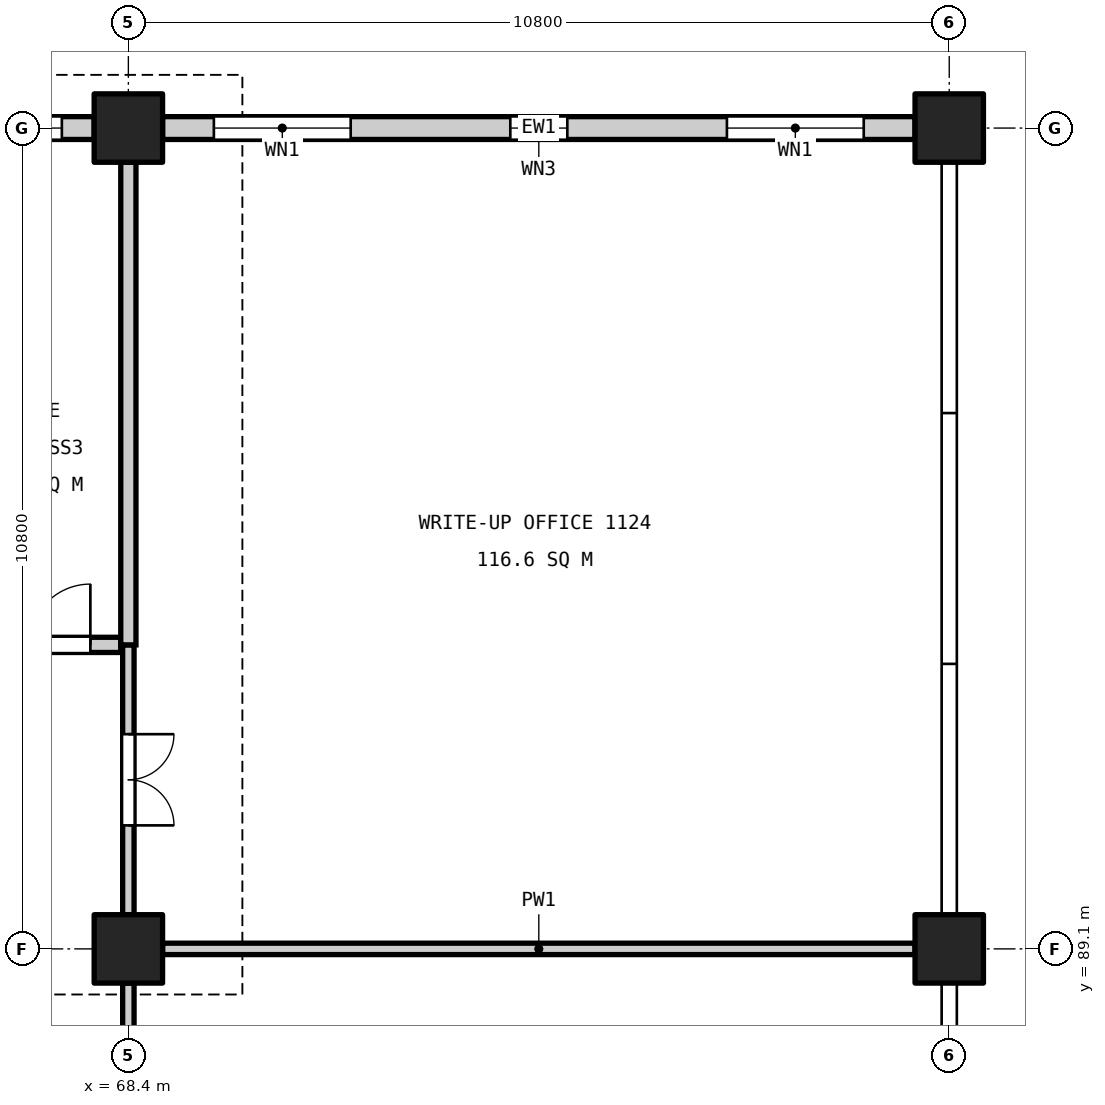
"""IFC4 building model, lengths in metres.
Left out: names, types, materials, properties, quantities, classifications, styles, units other than length and angle.
Written with IfcOpenShell. Run it as: python <this file> out.ifc"""

import sys

from ifc_helpers import new_model, si_unit, direction, frame, frame_2d, origin, origin_2d, place, context, subcontext, project, spatial, rectangle, extrude, element, fill, save


model = new_model("IFC4")
c1 = context("Model", 3, precision=1e-05, world=origin(), true_north=direction((0.0, 1.0)))
c2 = subcontext(c1, "Body", "Model", "MODEL_VIEW")
j1 = project(units=[si_unit("LENGTHUNIT", "METRE"), si_unit("PLANEANGLEUNIT", "RADIAN")], contexts=[c1])
p1 = place(None, origin())
s1 = spatial("IfcSite", under=j1, at=p1, CompositionType="ELEMENT")
p2 = place(p1, origin())
s2 = spatial("IfcBuilding", under=s1, at=p2, CompositionType="ELEMENT")
p3 = place(p2, frame((0.0, 0.0, 55.8)))
s3 = spatial("IfcBuildingStorey", under=s2, at=p3, CompositionType="ELEMENT", Elevation=55.8)
for number, where, z_axis, x_axis in (
    (1, (68.4, 89.1, 0.0), (0.0, 0.0, 1.0), (1.0, 0.0, 0.0)),
    (2, (68.4, 99.9, 0.0), (0.0, 0.0, 1.0), (1.0, 0.0, 0.0)),
    (3, (79.2, 89.1, 0.0), (0.0, 0.0, 1.0), (1.0, 0.0, 0.0)),
    (4, (79.2, 99.9, 0.0), (0.0, 0.0, 1.0), (1.0, 0.0, 0.0)),
):
    element("IfcColumn", number, at=place(p3, frame(where, z_axis=z_axis, x_axis=x_axis)), inside=s3, PredefinedType="COLUMN", context=c2, shape_type="SweptSolid", body=[
        extrude(rectangle(XDim=0.9, YDim=0.9, at=origin_2d()), origin(), (0.0, 0.0, 1.0), 4.8),
    ])
p4 = place(p3, frame((65.9, 99.9, 0.0), z_axis=(0.0, 0.0, 1.0), x_axis=(1.0, 0.0, 0.0)))
e5 = element("IfcWall", 5, at=p4, inside=s3, PredefinedType="STANDARD", context=c2, shape_type="SweptSolid", body=[
    extrude(rectangle(XDim=2.05, YDim=0.3, at=frame_2d((1.025, 0.0))), origin(), (0.0, 0.0, 1.0), 3.85),
])
p5 = place(p4, frame((0.425, 0.0, 0.9)))
e6 = element("IfcOpeningElement", 6, at=p5, cuts=e5, PredefinedType="OPENING", context=c2, shape_type="SweptSolid", body=[
    extrude(rectangle(XDim=1.2, YDim=2.4, at=frame_2d((0.6, 1.2))), frame((0.0, 0.16, 0.0), z_axis=(0.0, -1.0, 0.0), x_axis=(1.0, 0.0, 0.0)), (0.0, 0.0, 1.0), 0.32),
])
p6 = place(p3, frame((68.85, 99.9, 0.0), z_axis=(0.0, 0.0, 1.0), x_axis=(1.0, 0.0, 0.0)))
e7 = element("IfcWall", 7, at=p6, inside=s3, PredefinedType="STANDARD", context=c2, shape_type="SweptSolid", body=[
    extrude(rectangle(XDim=9.9, YDim=0.3, at=frame_2d((4.95, 0.0))), origin(), (0.0, 0.0, 1.0), 3.85),
])
p7 = place(p6, frame((0.675, 0.0, 0.9)))
e8 = element("IfcOpeningElement", 8, at=p7, cuts=e7, PredefinedType="OPENING", context=c2, shape_type="SweptSolid", body=[
    extrude(rectangle(XDim=1.8, YDim=2.4, at=frame_2d((0.9, 1.2))), frame((0.0, 0.16, 0.0), z_axis=(0.0, -1.0, 0.0), x_axis=(1.0, 0.0, 0.0)), (0.0, 0.0, 1.0), 0.32),
])
p8 = place(p6, frame((4.575, 0.0, 0.8)))
e9 = element("IfcOpeningElement", 9, at=p8, cuts=e7, PredefinedType="OPENING", context=c2, shape_type="SweptSolid", body=[
    extrude(rectangle(XDim=0.75, YDim=1.2, at=frame_2d((0.375, 0.6))), frame((0.0, 0.16, 0.0), z_axis=(0.0, -1.0, 0.0), x_axis=(1.0, 0.0, 0.0)), (0.0, 0.0, 1.0), 0.32),
])
p9 = place(p6, frame((7.425, 0.0, 0.9)))
e10 = element("IfcOpeningElement", 10, at=p9, cuts=e7, PredefinedType="OPENING", context=c2, shape_type="SweptSolid", body=[
    extrude(rectangle(XDim=1.8, YDim=2.4, at=frame_2d((0.9, 1.2))), frame((0.0, 0.16, 0.0), z_axis=(0.0, -1.0, 0.0), x_axis=(1.0, 0.0, 0.0)), (0.0, 0.0, 1.0), 0.32),
])
p10 = place(p3, frame((65.9, 93.1, 0.0), z_axis=(0.0, 0.0, 1.0), x_axis=(1.0, 0.0, 0.0)))
e11 = element("IfcWall", 11, at=p10, inside=s3, PredefinedType="PARTITIONING", context=c2, shape_type="SweptSolid", body=[
    extrude(rectangle(XDim=2.4, YDim=0.2, at=frame_2d((1.2, 0.0))), origin(), (0.0, 0.0, 1.0), 3.55),
])
p11 = place(p10, frame((0.4, 0.0, 0.0)))
e12 = element("IfcOpeningElement", 12, at=p11, cuts=e11, PredefinedType="OPENING", context=c2, shape_type="SweptSolid", body=[
    extrude(rectangle(XDim=1.6, YDim=2.1, at=frame_2d((0.8, 1.05))), frame((0.0, 0.11, 0.0), z_axis=(0.0, -1.0, 0.0), x_axis=(1.0, 0.0, 0.0)), (0.0, 0.0, 1.0), 0.22),
])
p12 = place(p3, frame((68.4, 78.75, 0.0), z_axis=(0.0, 0.0, 1.0), x_axis=(0.0, 1.0, 0.0)))
e13 = element("IfcWall", 13, at=p12, inside=s3, PredefinedType="PARTITIONING", context=c2, shape_type="SweptSolid", body=[
    extrude(rectangle(XDim=9.9, YDim=0.15, at=frame_2d((4.95, 0.0))), origin(), (0.0, 0.0, 1.0), 3.55),
])
p13 = place(p12, frame((0.975, 0.0, 0.0)))
e14 = element("IfcOpeningElement", 14, at=p13, cuts=e13, PredefinedType="OPENING", context=c2, shape_type="SweptSolid", body=[
    extrude(rectangle(XDim=1.2, YDim=2.1, at=frame_2d((0.6, 1.05))), frame((0.0, 0.085, 0.0), z_axis=(0.0, -1.0, 0.0), x_axis=(1.0, 0.0, 0.0)), (0.0, 0.0, 1.0), 0.17),
])
p14 = place(p12, frame((4.35, 0.0, 0.0)))
e15 = element("IfcOpeningElement", 15, at=p14, cuts=e13, PredefinedType="OPENING", context=c2, shape_type="SweptSolid", body=[
    extrude(rectangle(XDim=1.2, YDim=2.1, at=frame_2d((0.6, 1.05))), frame((0.0, 0.085, 0.0), z_axis=(0.0, -1.0, 0.0), x_axis=(1.0, 0.0, 0.0)), (0.0, 0.0, 1.0), 0.17),
])
p15 = place(p12, frame((7.725, 0.0, 0.0)))
e16 = element("IfcOpeningElement", 16, at=p15, cuts=e13, PredefinedType="OPENING", context=c2, shape_type="SweptSolid", body=[
    extrude(rectangle(XDim=1.2, YDim=2.1, at=frame_2d((0.6, 1.05))), frame((0.0, 0.085, 0.0), z_axis=(0.0, -1.0, 0.0), x_axis=(1.0, 0.0, 0.0)), (0.0, 0.0, 1.0), 0.17),
])
p16 = place(p3, frame((68.4, 89.55, 0.0), z_axis=(0.0, 0.0, 1.0), x_axis=(0.0, 1.0, 0.0)))
e17 = element("IfcWall", 17, at=p16, inside=s3, PredefinedType="PARTITIONING", context=c2, shape_type="SweptSolid", body=[
    extrude(rectangle(XDim=3.55, YDim=0.15, at=frame_2d((1.775, 0.0))), origin(), (0.0, 0.0, 1.0), 3.55),
])
p17 = place(p16, frame((1.175, 0.0, 0.0)))
e18 = element("IfcOpeningElement", 18, at=p17, cuts=e17, PredefinedType="OPENING", context=c2, shape_type="SweptSolid", body=[
    extrude(rectangle(XDim=1.2, YDim=2.1, at=frame_2d((0.6, 1.05))), frame((0.0, 0.085, 0.0), z_axis=(0.0, -1.0, 0.0), x_axis=(1.0, 0.0, 0.0)), (0.0, 0.0, 1.0), 0.17),
])
p18 = place(p3, frame((68.4, 93.1, 0.0), z_axis=(0.0, 0.0, 1.0), x_axis=(0.0, 1.0, 0.0)))
e19 = element("IfcWall", 19, at=p18, inside=s3, PredefinedType="PARTITIONING", context=c2, shape_type="SweptSolid", body=[
    extrude(rectangle(XDim=6.35, YDim=0.2, at=frame_2d((3.175, 0.0))), origin(), (0.0, 0.0, 1.0), 3.55),
])
p19 = place(p3, frame((68.85, 89.1, 0.0), z_axis=(0.0, 0.0, 1.0), x_axis=(1.0, 0.0, 0.0)))
e20 = element("IfcWall", 20, at=p19, inside=s3, PredefinedType="PARTITIONING", context=c2, shape_type="SweptSolid", body=[
    extrude(rectangle(XDim=9.9, YDim=0.15, at=frame_2d((4.95, 0.0))), origin(), (0.0, 0.0, 1.0), 3.85),
])
p20 = place(p5, origin())
e21 = element("IfcWindow", 21, at=p20, inside=s3, PartitioningType="SINGLE_PANEL", PredefinedType="WINDOW", context=c2, shape_type="SweptSolid", body=[
    extrude(rectangle(XDim=1.2, YDim=2.4, at=frame_2d((0.6, 1.2))), frame((0.0, 0.03, 0.0), z_axis=(0.0, -1.0, 0.0), x_axis=(1.0, 0.0, 0.0)), (0.0, 0.0, 1.0), 0.06),
])
fill(e6, e21)
p21 = place(p7, origin())
e22 = element("IfcWindow", 22, at=p21, inside=s3, PartitioningType="SINGLE_PANEL", PredefinedType="WINDOW", context=c2, shape_type="SweptSolid", body=[
    extrude(rectangle(XDim=1.8, YDim=2.4, at=frame_2d((0.9, 1.2))), frame((0.0, 0.03, 0.0), z_axis=(0.0, -1.0, 0.0), x_axis=(1.0, 0.0, 0.0)), (0.0, 0.0, 1.0), 0.06),
])
fill(e8, e22)
p22 = place(p8, origin())
e23 = element("IfcWindow", 23, at=p22, inside=s3, PartitioningType="SINGLE_PANEL", PredefinedType="WINDOW", context=c2, shape_type="SweptSolid", body=[
    extrude(rectangle(XDim=0.75, YDim=1.2, at=frame_2d((0.375, 0.6))), frame((0.0, 0.03, 0.0), z_axis=(0.0, -1.0, 0.0), x_axis=(1.0, 0.0, 0.0)), (0.0, 0.0, 1.0), 0.06),
])
fill(e9, e23)
p23 = place(p9, origin())
e24 = element("IfcWindow", 24, at=p23, inside=s3, PartitioningType="SINGLE_PANEL", PredefinedType="WINDOW", context=c2, shape_type="SweptSolid", body=[
    extrude(rectangle(XDim=1.8, YDim=2.4, at=frame_2d((0.9, 1.2))), frame((0.0, 0.03, 0.0), z_axis=(0.0, -1.0, 0.0), x_axis=(1.0, 0.0, 0.0)), (0.0, 0.0, 1.0), 0.06),
])
fill(e10, e24)
p24 = place(p17, frame((1.2, 0.0, 0.0), z_axis=(0.0, 0.0, 1.0), x_axis=(-1.0, 0.0, 0.0)))
e25 = element("IfcDoor", 25, at=p24, inside=s3, OperationType="DOUBLE_DOOR_SINGLE_SWING", PredefinedType="DOOR", context=c2, shape_type="SweptSolid", body=[
    extrude(rectangle(XDim=1.2, YDim=2.1, at=frame_2d((0.6, 1.05))), frame((0.0, 0.025, 0.0), z_axis=(0.0, -1.0, 0.0), x_axis=(1.0, 0.0, 0.0)), (0.0, 0.0, 1.0), 0.05),
])
fill(e18, e25)
p25 = place(p11, origin())
e26 = element("IfcDoor", 26, at=p25, inside=s3, OperationType="DOUBLE_DOOR_SINGLE_SWING", PredefinedType="DOOR", context=c2, shape_type="SweptSolid", body=[
    extrude(rectangle(XDim=1.6, YDim=2.1, at=frame_2d((0.8, 1.05))), frame((0.0, 0.025, 0.0), z_axis=(0.0, -1.0, 0.0), x_axis=(1.0, 0.0, 0.0)), (0.0, 0.0, 1.0), 0.05),
])
fill(e12, e26)
save(model, sys.argv[1])
